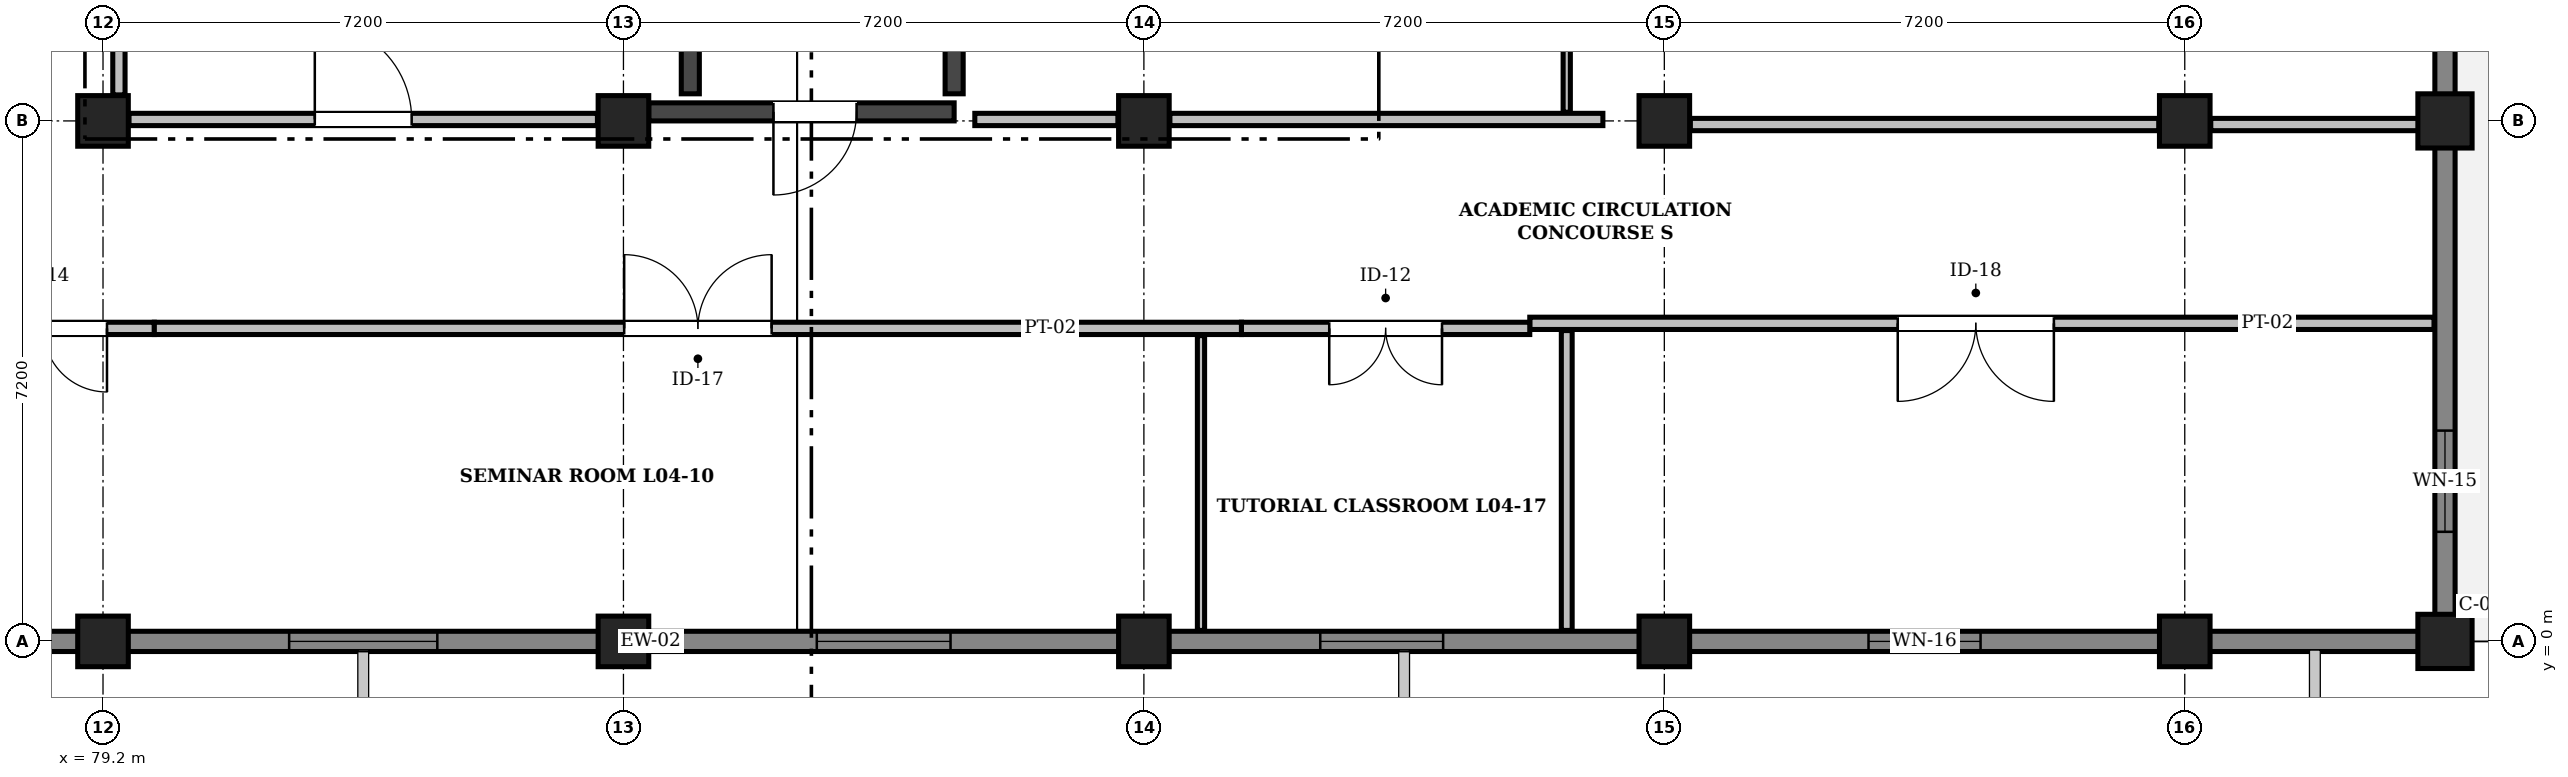
"""IFC4 building model, lengths in metres.
Left out: names, types, materials, properties, quantities, classifications, styles, units other than length and angle.
Written with IfcOpenShell. Run it as: python <this file> out.ifc"""

import sys

from ifc_helpers import new_model, si_unit, direction, frame, frame_2d, origin, origin_2d, place, context, subcontext, project, spatial, rectangle, extrude, element, fill, save


model = new_model("IFC4")
c1 = context("Model", 3, precision=1e-05, world=origin(), true_north=direction((0.0, 1.0)))
c2 = subcontext(c1, "Body", "Model", "MODEL_VIEW")
j1 = project(units=[si_unit("LENGTHUNIT", "METRE"), si_unit("PLANEANGLEUNIT", "RADIAN")], contexts=[c1])
p1 = place(None, origin())
s1 = spatial("IfcSite", under=j1, at=p1, CompositionType="ELEMENT")
p2 = place(p1, origin())
s2 = spatial("IfcBuilding", under=s1, at=p2, CompositionType="ELEMENT")
p3 = place(p2, frame((0.0, 0.0, 18.9)))
s3 = spatial("IfcBuildingStorey", under=s2, at=p3, CompositionType="ELEMENT", Elevation=18.9)
for number, where, z_axis, x_axis in (
    (1, (79.2, 0.0, 0.0), (0.0, 0.0, 1.0), (1.0, 0.0, 0.0)),
    (2, (79.2, 7.2, 0.0), (0.0, 0.0, 1.0), (1.0, 0.0, 0.0)),
    (3, (86.4, 0.0, 0.0), (0.0, 0.0, 1.0), (1.0, 0.0, 0.0)),
    (4, (86.4, 7.2, 0.0), (0.0, 0.0, 1.0), (1.0, 0.0, 0.0)),
    (5, (93.6, 0.0, 0.0), (0.0, 0.0, 1.0), (1.0, 0.0, 0.0)),
    (6, (93.6, 7.2, 0.0), (0.0, 0.0, 1.0), (1.0, 0.0, 0.0)),
    (7, (100.8, 0.0, 0.0), (0.0, 0.0, 1.0), (1.0, 0.0, 0.0)),
    (8, (100.8, 7.2, 0.0), (0.0, 0.0, 1.0), (1.0, 0.0, 0.0)),
    (9, (108.0, 0.0, 0.0), (0.0, 0.0, 1.0), (1.0, 0.0, 0.0)),
    (10, (108.0, 7.2, 0.0), (0.0, 0.0, 1.0), (1.0, 0.0, 0.0)),
):
    element("IfcColumn", number, at=place(p3, frame(where, z_axis=z_axis, x_axis=x_axis)), inside=s3, PredefinedType="COLUMN", context=c2, shape_type="SweptSolid", body=[
        extrude(rectangle(XDim=0.7, YDim=0.7, at=origin_2d()), origin(), (0.0, 0.0, 1.0), 4.5),
    ])
for number, where, z_axis, x_axis in (
    (11, (111.6, 0.0, 0.0), (0.0, 0.0, 1.0), (1.0, 0.0, 0.0)),
    (12, (111.6, 7.2, 0.0), (0.0, 0.0, 1.0), (1.0, 0.0, 0.0)),
):
    element("IfcColumn", number, at=place(p3, frame(where, z_axis=z_axis, x_axis=x_axis)), inside=s3, PredefinedType="COLUMN", context=c2, shape_type="SweptSolid", body=[
        extrude(rectangle(XDim=0.75, YDim=0.75, at=origin_2d()), origin(), (0.0, 0.0, 1.0), 4.5),
    ])
p4 = place(p3, frame((111.6, 14.4, 0.0), z_axis=(0.0, 0.0, 1.0), x_axis=(0.0, -1.0, 0.0)))
e13 = element("IfcWall", 13, at=p4, inside=s3, PredefinedType="SOLIDWALL", context=c2, shape_type="SweptSolid", body=[
    extrude(rectangle(XDim=7.2, YDim=0.28, at=frame_2d((3.6, 0.0))), origin(), (0.0, 0.0, 1.0), 4.22),
])
p5 = place(p4, frame((2.975, 0.0, 0.95)))
e14 = element("IfcOpeningElement", 14, at=p5, cuts=e13, PredefinedType="OPENING", context=c2, shape_type="SweptSolid", body=[
    extrude(rectangle(XDim=1.25, YDim=1.55, at=frame_2d((0.625, 0.775))), frame((0.0, 0.152, 0.0), z_axis=(0.0, -1.0, 0.0), x_axis=(1.0, 0.0, 0.0)), (0.0, 0.0, 1.0), 0.304),
])
p6 = place(p3, frame((111.6, 7.2, 0.0), z_axis=(0.0, 0.0, 1.0), x_axis=(0.0, -1.0, 0.0)))
e15 = element("IfcWall", 15, at=p6, inside=s3, PredefinedType="SOLIDWALL", context=c2, shape_type="SweptSolid", body=[
    extrude(rectangle(XDim=7.048, YDim=0.28, at=frame_2d((3.524, 0.0))), origin(), (0.0, 0.0, 1.0), 4.22),
])
p7 = place(p6, frame((4.284, 0.0, 0.95)))
e16 = element("IfcOpeningElement", 16, at=p7, cuts=e15, PredefinedType="OPENING", context=c2, shape_type="SweptSolid", body=[
    extrude(rectangle(XDim=1.4, YDim=1.55, at=frame_2d((0.7, 0.775))), frame((0.0, 0.152, 0.0), z_axis=(0.0, -1.0, 0.0), x_axis=(1.0, 0.0, 0.0)), (0.0, 0.0, 1.0), 0.304),
])
p8 = place(p3, frame((111.75, 0.0, 0.0), z_axis=(0.0, 0.0, 1.0), x_axis=(-1.0, 0.0, 0.0)))
e17 = element("IfcWall", 17, at=p8, inside=s3, PredefinedType="SOLIDWALL", context=c2, shape_type="SweptSolid", body=[
    extrude(rectangle(XDim=3.75, YDim=0.28, at=frame_2d((1.875, 0.0))), origin(), (0.0, 0.0, 1.0), 4.22),
])
p9 = place(p3, frame((108.0, 0.0, 0.0), z_axis=(0.0, 0.0, 1.0), x_axis=(-1.0, 0.0, 0.0)))
e18 = element("IfcWall", 18, at=p9, inside=s3, PredefinedType="SOLIDWALL", context=c2, shape_type="SweptSolid", body=[
    extrude(rectangle(XDim=7.2, YDim=0.28, at=frame_2d((3.6, 0.0))), origin(), (0.0, 0.0, 1.0), 4.22),
])
p10 = place(p9, frame((2.825, 0.0, 0.95)))
e19 = element("IfcOpeningElement", 19, at=p10, cuts=e18, PredefinedType="OPENING", context=c2, shape_type="SweptSolid", body=[
    extrude(rectangle(XDim=1.55, YDim=1.55, at=frame_2d((0.775, 0.775))), frame((0.0, 0.152, 0.0), z_axis=(0.0, -1.0, 0.0), x_axis=(1.0, 0.0, 0.0)), (0.0, 0.0, 1.0), 0.304),
])
p11 = place(p3, frame((100.8, 0.0, 0.0), z_axis=(0.0, 0.0, 1.0), x_axis=(-1.0, 0.0, 0.0)))
e20 = element("IfcWall", 20, at=p11, inside=s3, PredefinedType="SOLIDWALL", context=c2, shape_type="SweptSolid", body=[
    extrude(rectangle(XDim=7.2, YDim=0.28, at=frame_2d((3.6, 0.0))), origin(), (0.0, 0.0, 1.0), 4.22),
])
p12 = place(p11, frame((3.06, 0.0, 0.95)))
e21 = element("IfcOpeningElement", 21, at=p12, cuts=e20, PredefinedType="OPENING", context=c2, shape_type="SweptSolid", body=[
    extrude(rectangle(XDim=1.7, YDim=1.55, at=frame_2d((0.85, 0.775))), frame((0.0, 0.152, 0.0), z_axis=(0.0, -1.0, 0.0), x_axis=(1.0, 0.0, 0.0)), (0.0, 0.0, 1.0), 0.304),
])
p13 = place(p3, frame((93.6, 0.0, 0.0), z_axis=(0.0, 0.0, 1.0), x_axis=(-1.0, 0.0, 0.0)))
e22 = element("IfcWall", 22, at=p13, inside=s3, PredefinedType="SOLIDWALL", context=c2, shape_type="SweptSolid", body=[
    extrude(rectangle(XDim=7.2, YDim=0.28, at=frame_2d((3.6, 0.0))), origin(), (0.0, 0.0, 1.0), 4.22),
])
p14 = place(p13, frame((2.675, 0.0, 0.95)))
e23 = element("IfcOpeningElement", 23, at=p14, cuts=e22, PredefinedType="OPENING", context=c2, shape_type="SweptSolid", body=[
    extrude(rectangle(XDim=1.85, YDim=1.55, at=frame_2d((0.925, 0.775))), frame((0.0, 0.152, 0.0), z_axis=(0.0, -1.0, 0.0), x_axis=(1.0, 0.0, 0.0)), (0.0, 0.0, 1.0), 0.304),
])
p15 = place(p3, frame((86.4, 0.0, 0.0), z_axis=(0.0, 0.0, 1.0), x_axis=(-1.0, 0.0, 0.0)))
e24 = element("IfcWall", 24, at=p15, inside=s3, PredefinedType="SOLIDWALL", context=c2, shape_type="SweptSolid", body=[
    extrude(rectangle(XDim=7.2, YDim=0.28, at=frame_2d((3.6, 0.0))), origin(), (0.0, 0.0, 1.0), 4.22),
])
p16 = place(p15, frame((2.575, 0.0, 0.95)))
e25 = element("IfcOpeningElement", 25, at=p16, cuts=e24, PredefinedType="OPENING", context=c2, shape_type="SweptSolid", body=[
    extrude(rectangle(XDim=2.05, YDim=1.55, at=frame_2d((1.025, 0.775))), frame((0.0, 0.152, 0.0), z_axis=(0.0, -1.0, 0.0), x_axis=(1.0, 0.0, 0.0)), (0.0, 0.0, 1.0), 0.304),
])
p17 = place(p3, frame((79.2, 0.0, 0.0), z_axis=(0.0, 0.0, 1.0), x_axis=(-1.0, 0.0, 0.0)))
e26 = element("IfcWall", 26, at=p17, inside=s3, PredefinedType="SOLIDWALL", context=c2, shape_type="SweptSolid", body=[
    extrude(rectangle(XDim=7.2, YDim=0.28, at=frame_2d((3.6, 0.0))), origin(), (0.0, 0.0, 1.0), 4.22),
])
p18 = place(p17, frame((3.365, 0.0, 0.95)))
e27 = element("IfcOpeningElement", 27, at=p18, cuts=e26, PredefinedType="OPENING", context=c2, shape_type="SweptSolid", body=[
    extrude(rectangle(XDim=2.25, YDim=1.55, at=frame_2d((1.125, 0.775))), frame((0.0, 0.152, 0.0), z_axis=(0.0, -1.0, 0.0), x_axis=(1.0, 0.0, 0.0)), (0.0, 0.0, 1.0), 0.304),
])
p19 = place(p3, frame((86.75, 7.325, 0.0), z_axis=(0.0, 0.0, 1.0), x_axis=(1.0, 0.0, 0.0)))
e28 = element("IfcWall", 28, at=p19, inside=s3, PredefinedType="SHEAR", context=c2, shape_type="SweptSolid", body=[
    extrude(rectangle(XDim=4.225, YDim=0.25, at=frame_2d((2.113, 0.0))), origin(), (0.0, 0.0, 1.0), 4.25),
])
p20 = place(p19, frame((1.725, 0.0, 0.0)))
e29 = element("IfcOpeningElement", 29, at=p20, cuts=e28, PredefinedType="OPENING", context=c2, shape_type="SweptSolid", body=[
    extrude(rectangle(XDim=1.15, YDim=2.15, at=frame_2d((0.575, 1.075))), frame((0.0, 0.137, 0.0), z_axis=(0.0, -1.0, 0.0), x_axis=(1.0, 0.0, 0.0)), (0.0, 0.0, 1.0), 0.274),
])
p21 = place(p3, frame((87.325, 7.575, 0.0), z_axis=(0.0, 0.0, 1.0), x_axis=(0.0, 1.0, 0.0)))
e30 = element("IfcWall", 30, at=p21, inside=s3, PredefinedType="SHEAR", context=c2, shape_type="SweptSolid", body=[
    extrude(rectangle(XDim=2.77, YDim=0.25, at=frame_2d((1.385, 0.0))), origin(), (0.0, 0.0, 1.0), 4.25),
])
p22 = place(p3, frame((90.975, 7.575, 0.0), z_axis=(0.0, 0.0, 1.0), x_axis=(0.0, 1.0, 0.0)))
e31 = element("IfcWall", 31, at=p22, inside=s3, PredefinedType="SHEAR", context=c2, shape_type="SweptSolid", body=[
    extrude(rectangle(XDim=3.225, YDim=0.25, at=frame_2d((1.613, 0.0))), origin(), (0.0, 0.0, 1.0), 4.25),
])
p23 = place(p3, frame((79.42, 7.56, 0.0), z_axis=(0.0, 0.0, 1.0), x_axis=(0.0, 1.0, 0.0)))
e32 = element("IfcWall", 32, at=p23, inside=s3, PredefinedType="PARTITIONING", context=c2, shape_type="SweptSolid", body=[
    extrude(rectangle(XDim=2.49, YDim=0.17, at=frame_2d((1.245, 0.0))), origin(), (0.0, 0.0, 1.0), 3.73),
])
p24 = place(p3, frame((76.84, 4.33, 0.0), z_axis=(0.0, 0.0, 1.0), x_axis=(1.0, 0.0, 0.0)))
e33 = element("IfcWall", 33, at=p24, inside=s3, PredefinedType="PARTITIONING", context=c2, shape_type="SweptSolid", body=[
    extrude(rectangle(XDim=3.07, YDim=0.17, at=frame_2d((1.535, 0.0))), origin(), (0.0, 0.0, 1.0), 4.16),
])
p25 = place(p24, frame((0.655, 0.0, 0.0)))
e34 = element("IfcOpeningElement", 34, at=p25, cuts=e33, PredefinedType="OPENING", context=c2, shape_type="SweptSolid", body=[
    extrude(rectangle(XDim=1.76, YDim=2.3, at=frame_2d((0.88, 1.15))), frame((0.0, 0.097, 0.0), z_axis=(0.0, -1.0, 0.0), x_axis=(1.0, 0.0, 0.0)), (0.0, 0.0, 1.0), 0.194),
])
p26 = place(p3, frame((79.56, 7.22, 0.0), z_axis=(0.0, 0.0, 1.0), x_axis=(1.0, 0.0, 0.0)))
e35 = element("IfcWall", 35, at=p26, inside=s3, PredefinedType="PARTITIONING", context=c2, shape_type="SweptSolid", body=[
    extrude(rectangle(XDim=6.48, YDim=0.17, at=frame_2d((3.24, 0.0))), origin(), (0.0, 0.0, 1.0), 3.73),
])
p27 = place(p26, frame((2.57, 0.0, 0.0)))
e36 = element("IfcOpeningElement", 36, at=p27, cuts=e35, PredefinedType="OPENING", context=c2, shape_type="SweptSolid", body=[
    extrude(rectangle(XDim=1.34, YDim=2.24, at=frame_2d((0.67, 1.12))), frame((0.0, 0.097, 0.0), z_axis=(0.0, -1.0, 0.0), x_axis=(1.0, 0.0, 0.0)), (0.0, 0.0, 1.0), 0.194),
])
p28 = place(p3, frame((91.261, 7.22, 0.0), z_axis=(0.0, 0.0, 1.0), x_axis=(1.0, 0.0, 0.0)))
e37 = element("IfcWall", 37, at=p28, inside=s3, PredefinedType="PARTITIONING", context=c2, shape_type="SweptSolid", body=[
    extrude(rectangle(XDim=1.979, YDim=0.17, at=frame_2d((0.99, 0.0))), origin(), (0.0, 0.0, 1.0), 3.73),
])
p29 = place(p3, frame((79.91, 4.33, 0.0), z_axis=(0.0, 0.0, 1.0), x_axis=(1.0, 0.0, 0.0)))
e38 = element("IfcWall", 38, at=p29, inside=s3, PredefinedType="PARTITIONING", context=c2, shape_type="SweptSolid", body=[
    extrude(rectangle(XDim=15.04, YDim=0.17, at=frame_2d((7.52, 0.0))), origin(), (0.0, 0.0, 1.0), 4.16),
])
p30 = place(p29, frame((6.5, 0.0, 0.0)))
e39 = element("IfcOpeningElement", 39, at=p30, cuts=e38, PredefinedType="OPENING", context=c2, shape_type="SweptSolid", body=[
    extrude(rectangle(XDim=2.04, YDim=2.34, at=frame_2d((1.02, 1.17))), frame((0.0, 0.097, 0.0), z_axis=(0.0, -1.0, 0.0), x_axis=(1.0, 0.0, 0.0)), (0.0, 0.0, 1.0), 0.194),
])
p31 = place(p3, frame((98.938, 4.4, 0.0), z_axis=(0.0, 0.0, 1.0), x_axis=(1.0, 0.0, 0.0)))
e40 = element("IfcWall", 40, at=p31, inside=s3, PredefinedType="PARTITIONING", context=c2, shape_type="SweptSolid", body=[
    extrude(rectangle(XDim=12.51, YDim=0.17, at=frame_2d((6.255, 0.0))), origin(), (0.0, 0.0, 1.0), 4.16),
])
p32 = place(p31, frame((5.091, 0.0, 0.0)))
e41 = element("IfcOpeningElement", 41, at=p32, cuts=e40, PredefinedType="OPENING", context=c2, shape_type="SweptSolid", body=[
    extrude(rectangle(XDim=2.16, YDim=2.35, at=frame_2d((1.08, 1.175))), frame((0.0, 0.097, 0.0), z_axis=(0.0, -1.0, 0.0), x_axis=(1.0, 0.0, 0.0)), (0.0, 0.0, 1.0), 0.194),
])
p33 = place(p3, frame((101.16, 7.15, 0.0), z_axis=(0.0, 0.0, 1.0), x_axis=(1.0, 0.0, 0.0)))
e42 = element("IfcWall", 42, at=p33, inside=s3, PredefinedType="PARTITIONING", context=c2, shape_type="SweptSolid", body=[
    extrude(rectangle(XDim=6.48, YDim=0.17, at=frame_2d((3.24, 0.0))), origin(), (0.0, 0.0, 1.0), 3.73),
])
p34 = place(p3, frame((108.36, 7.15, 0.0), z_axis=(0.0, 0.0, 1.0), x_axis=(1.0, 0.0, 0.0)))
e43 = element("IfcWall", 43, at=p34, inside=s3, PredefinedType="PARTITIONING", context=c2, shape_type="SweptSolid", body=[
    extrude(rectangle(XDim=3.088, YDim=0.17, at=frame_2d((1.544, 0.0))), origin(), (0.0, 0.0, 1.0), 3.73),
])
p35 = place(p3, frame((93.96, 7.22, 0.0), z_axis=(0.0, 0.0, 1.0), x_axis=(1.0, 0.0, 0.0)))
e44 = element("IfcWall", 44, at=p35, inside=s3, PredefinedType="PARTITIONING", context=c2, shape_type="SweptSolid", body=[
    extrude(rectangle(XDim=5.99, YDim=0.17, at=frame_2d((2.995, 0.0))), origin(), (0.0, 0.0, 1.0), 3.73),
])
p36 = place(p3, frame((94.95, 4.33, 0.0), z_axis=(0.0, 0.0, 1.0), x_axis=(1.0, 0.0, 0.0)))
e45 = element("IfcWall", 45, at=p36, inside=s3, PredefinedType="PARTITIONING", context=c2, shape_type="SweptSolid", body=[
    extrude(rectangle(XDim=3.989, YDim=0.17, at=frame_2d((1.994, 0.0))), origin(), (0.0, 0.0, 1.0), 4.16),
])
p37 = place(p36, frame((1.214, 0.0, 0.0)))
e46 = element("IfcOpeningElement", 46, at=p37, cuts=e45, PredefinedType="OPENING", context=c2, shape_type="SweptSolid", body=[
    extrude(rectangle(XDim=1.56, YDim=2.26, at=frame_2d((0.78, 1.13))), frame((0.0, 0.097, 0.0), z_axis=(0.0, -1.0, 0.0), x_axis=(1.0, 0.0, 0.0)), (0.0, 0.0, 1.0), 0.194),
])
p38 = place(p3, frame((94.39, 0.152, 0.0), z_axis=(0.0, 0.0, 1.0), x_axis=(0.0, 1.0, 0.0)))
e47 = element("IfcWall", 47, at=p38, inside=s3, PredefinedType="PARTITIONING", context=c2, shape_type="SweptSolid", body=[
    extrude(rectangle(XDim=4.078, YDim=0.1, at=frame_2d((2.039, 0.0))), origin(), (0.0, 0.0, 1.0), 4.16),
])
p39 = place(p3, frame((99.45, 7.32, 0.0), z_axis=(0.0, 0.0, 1.0), x_axis=(0.0, 1.0, 0.0)))
e48 = element("IfcWall", 48, at=p39, inside=s3, PredefinedType="PARTITIONING", context=c2, shape_type="SweptSolid", body=[
    extrude(rectangle(XDim=7.11, YDim=0.1, at=frame_2d((3.555, 0.0))), origin(), (0.0, 0.0, 1.0), 4.16),
])
p40 = place(p39, frame((2.535, 0.0, 0.0)))
e49 = element("IfcOpeningElement", 49, at=p40, cuts=e48, PredefinedType="OPENING", context=c2, shape_type="SweptSolid", body=[
    extrude(rectangle(XDim=2.04, YDim=2.34, at=frame_2d((1.02, 1.17))), frame((0.0, 0.062, 0.0), z_axis=(0.0, -1.0, 0.0), x_axis=(1.0, 0.0, 0.0)), (0.0, 0.0, 1.0), 0.124),
])
p41 = place(p3, frame((99.45, 0.152, 0.0), z_axis=(0.0, 0.0, 1.0), x_axis=(0.0, 1.0, 0.0)))
e50 = element("IfcWall", 50, at=p41, inside=s3, PredefinedType="PARTITIONING", context=c2, shape_type="SweptSolid", body=[
    extrude(rectangle(XDim=4.148, YDim=0.15, at=frame_2d((2.074, 0.0))), origin(), (0.0, 0.0, 1.0), 4.16),
])
p42 = place(p7, origin())
e51 = element("IfcWindow", 51, at=p42, inside=s3, PartitioningType="SINGLE_PANEL", PredefinedType="WINDOW", context=c2, shape_type="SweptSolid", body=[
    extrude(rectangle(XDim=1.4, YDim=1.55, at=frame_2d((0.7, 0.775))), frame((0.0, 0.03, 0.0), z_axis=(0.0, -1.0, 0.0), x_axis=(1.0, 0.0, 0.0)), (0.0, 0.0, 1.0), 0.06),
])
fill(e16, e51)
p43 = place(p10, origin())
e52 = element("IfcWindow", 52, at=p43, inside=s3, PartitioningType="SINGLE_PANEL", PredefinedType="WINDOW", context=c2, shape_type="SweptSolid", body=[
    extrude(rectangle(XDim=1.55, YDim=1.55, at=frame_2d((0.775, 0.775))), frame((0.0, 0.03, 0.0), z_axis=(0.0, -1.0, 0.0), x_axis=(1.0, 0.0, 0.0)), (0.0, 0.0, 1.0), 0.06),
])
fill(e19, e52)
p44 = place(p12, origin())
e53 = element("IfcWindow", 53, at=p44, inside=s3, PartitioningType="SINGLE_PANEL", PredefinedType="WINDOW", context=c2, shape_type="SweptSolid", body=[
    extrude(rectangle(XDim=1.7, YDim=1.55, at=frame_2d((0.85, 0.775))), frame((0.0, 0.03, 0.0), z_axis=(0.0, -1.0, 0.0), x_axis=(1.0, 0.0, 0.0)), (0.0, 0.0, 1.0), 0.06),
])
fill(e21, e53)
p45 = place(p14, origin())
e54 = element("IfcWindow", 54, at=p45, inside=s3, PartitioningType="SINGLE_PANEL", PredefinedType="WINDOW", context=c2, shape_type="SweptSolid", body=[
    extrude(rectangle(XDim=1.85, YDim=1.55, at=frame_2d((0.925, 0.775))), frame((0.0, 0.03, 0.0), z_axis=(0.0, -1.0, 0.0), x_axis=(1.0, 0.0, 0.0)), (0.0, 0.0, 1.0), 0.06),
])
fill(e23, e54)
p46 = place(p16, origin())
e55 = element("IfcWindow", 55, at=p46, inside=s3, PartitioningType="SINGLE_PANEL", PredefinedType="WINDOW", context=c2, shape_type="SweptSolid", body=[
    extrude(rectangle(XDim=2.05, YDim=1.55, at=frame_2d((1.025, 0.775))), frame((0.0, 0.03, 0.0), z_axis=(0.0, -1.0, 0.0), x_axis=(1.0, 0.0, 0.0)), (0.0, 0.0, 1.0), 0.06),
])
fill(e25, e55)
p47 = place(p20, frame((1.15, 0.0, 0.0), z_axis=(0.0, 0.0, 1.0), x_axis=(-1.0, 0.0, 0.0)))
e56 = element("IfcDoor", 56, at=p47, inside=s3, OperationType="SINGLE_SWING_RIGHT", PredefinedType="DOOR", context=c2, shape_type="SweptSolid", body=[
    extrude(rectangle(XDim=1.15, YDim=2.15, at=frame_2d((0.575, 1.075))), frame((0.0, 0.025, 0.0), z_axis=(0.0, -1.0, 0.0), x_axis=(1.0, 0.0, 0.0)), (0.0, 0.0, 1.0), 0.05),
])
fill(e29, e56)
p48 = place(p30, origin())
e57 = element("IfcDoor", 57, at=p48, inside=s3, OperationType="DOUBLE_DOOR_SINGLE_SWING", PredefinedType="DOOR", context=c2, shape_type="SweptSolid", body=[
    extrude(rectangle(XDim=2.04, YDim=2.34, at=frame_2d((1.02, 1.17))), frame((0.0, 0.025, 0.0), z_axis=(0.0, -1.0, 0.0), x_axis=(1.0, 0.0, 0.0)), (0.0, 0.0, 1.0), 0.05),
])
fill(e39, e57)
p49 = place(p32, frame((2.16, 0.0, 0.0), z_axis=(0.0, 0.0, 1.0), x_axis=(-1.0, 0.0, 0.0)))
e58 = element("IfcDoor", 58, at=p49, inside=s3, OperationType="DOUBLE_DOOR_SINGLE_SWING", PredefinedType="DOOR", context=c2, shape_type="SweptSolid", body=[
    extrude(rectangle(XDim=2.16, YDim=2.35, at=frame_2d((1.08, 1.175))), frame((0.0, 0.025, 0.0), z_axis=(0.0, -1.0, 0.0), x_axis=(1.0, 0.0, 0.0)), (0.0, 0.0, 1.0), 0.05),
])
fill(e41, e58)
p50 = place(p27, origin())
e59 = element("IfcDoor", 59, at=p50, inside=s3, OperationType="SINGLE_SWING_LEFT", PredefinedType="DOOR", context=c2, shape_type="SweptSolid", body=[
    extrude(rectangle(XDim=1.34, YDim=2.24, at=frame_2d((0.67, 1.12))), frame((0.0, 0.025, 0.0), z_axis=(0.0, -1.0, 0.0), x_axis=(1.0, 0.0, 0.0)), (0.0, 0.0, 1.0), 0.05),
])
fill(e36, e59)
p51 = place(p37, frame((1.56, 0.0, 0.0), z_axis=(0.0, 0.0, 1.0), x_axis=(-1.0, 0.0, 0.0)))
e60 = element("IfcDoor", 60, at=p51, inside=s3, OperationType="DOUBLE_DOOR_SINGLE_SWING", PredefinedType="DOOR", context=c2, shape_type="SweptSolid", body=[
    extrude(rectangle(XDim=1.56, YDim=2.26, at=frame_2d((0.78, 1.13))), frame((0.0, 0.025, 0.0), z_axis=(0.0, -1.0, 0.0), x_axis=(1.0, 0.0, 0.0)), (0.0, 0.0, 1.0), 0.05),
])
fill(e46, e60)
p52 = place(p25, frame((1.76, 0.0, 0.0), z_axis=(0.0, 0.0, 1.0), x_axis=(-1.0, 0.0, 0.0)))
e61 = element("IfcDoor", 61, at=p52, inside=s3, OperationType="DOUBLE_DOOR_SINGLE_SWING", PredefinedType="DOOR", context=c2, shape_type="SweptSolid", body=[
    extrude(rectangle(XDim=1.76, YDim=2.3, at=frame_2d((0.88, 1.15))), frame((0.0, 0.025, 0.0), z_axis=(0.0, -1.0, 0.0), x_axis=(1.0, 0.0, 0.0)), (0.0, 0.0, 1.0), 0.05),
])
fill(e34, e61)
save(model, sys.argv[1])
